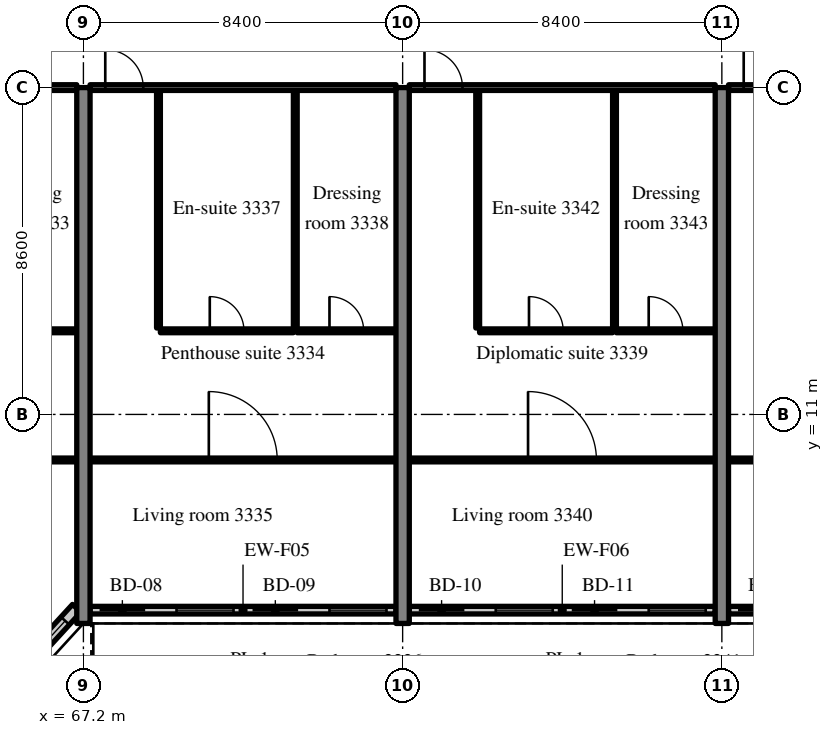
"""IFC4 building model, lengths in metres.
Left out: names, types, materials, properties, quantities, classifications, styles, units other than length and angle.
Written with IfcOpenShell. Run it as: python <this file> out.ifc"""

import sys

from ifc_helpers import new_model, si_unit, direction, frame, frame_2d, origin, place, context, subcontext, project, spatial, rectangle, extrude, source, transform, mapped, element, fill, save


model = new_model("IFC4")
c1 = context("Model", 3, precision=1e-05, world=origin(), true_north=direction((0.0, 1.0)))
c2 = subcontext(c1, "Body", "Model", "MODEL_VIEW")
j1 = project(units=[si_unit("LENGTHUNIT", "METRE"), si_unit("PLANEANGLEUNIT", "RADIAN")], contexts=[c1])
p1 = place(None, origin())
s1 = spatial("IfcSite", under=j1, at=p1, CompositionType="ELEMENT")
p2 = place(p1, origin())
s2 = spatial("IfcBuilding", under=s1, at=p2, CompositionType="ELEMENT")
p3 = place(p2, frame((0.0, 0.0, 137.0)))
s3 = spatial("IfcBuildingStorey", under=s2, at=p3, CompositionType="ELEMENT", Elevation=137.0)
m1 = source(origin(), c2, "Body", "SweptSolid", [
    extrude(rectangle(XDim=14.1, YDim=0.35, at=frame_2d((7.05, 0.0))), origin(), (0.0, 0.0, 1.0), 3.52),
])
for number, where, z_axis, x_axis in (
    (1, (67.2, 5.5, 0.0), (0.0, 0.0, 1.0), (0.0, 1.0, 0.0)),
    (2, (75.6, 5.5, 0.0), (0.0, 0.0, 1.0), (0.0, 1.0, 0.0)),
    (3, (84.0, 5.5, 0.0), (0.0, 0.0, 1.0), (0.0, 1.0, 0.0)),
):
    element("IfcWall", number, at=place(p3, frame(where, z_axis=z_axis, x_axis=x_axis)), inside=s3, PredefinedType="SHEAR", context=c2, shape_type="MappedRepresentation", body=[
        mapped(m1, transform((0.0, 0.0, 0.0), scale=1.0)),
    ])
m2 = source(origin(), c2, "Body", "SweptSolid", [
    extrude(rectangle(XDim=2.398, YDim=0.3, at=frame_2d((1.199, 0.0))), origin(), (0.0, 0.0, 1.0), 3.52),
])
p4 = place(p3, frame((65.404, 4.131, 0.0), z_axis=(0.0, 0.0, 1.0), x_axis=(0.675374189419, 0.737475222815, 0.0)))
e4 = element("IfcWall", 4, at=p4, inside=s3, PredefinedType="SOLIDWALL", context=c2, shape_type="MappedRepresentation", body=[
    mapped(m2, transform((0.0, 0.0, 0.0), scale=1.0)),
])
m3 = source(origin(), c2, "Body", "SweptSolid", [
    extrude(rectangle(XDim=1.5, YDim=2.0, at=frame_2d((0.75, 1.0))), frame((0.0, 0.16, 0.0), z_axis=(0.0, -1.0, 0.0), x_axis=(1.0, 0.0, 0.0)), (0.0, 0.0, 1.0), 0.32),
])
p5 = place(p4, frame((0.449, 0.0, 0.9)))
e5 = element("IfcOpeningElement", 5, at=p5, cuts=e4, PredefinedType="OPENING", context=c2, shape_type="MappedRepresentation", body=[
    mapped(m3, transform((0.0, 0.0, 0.0), scale=1.0)),
])
m4 = source(origin(), c2, "Body", "SweptSolid", [
    extrude(rectangle(XDim=8.05, YDim=0.2, at=frame_2d((4.025, 0.0))), origin(), (0.0, 0.0, 1.0), 2.82),
])
p6 = place(p3, frame((67.375, 5.85, 0.0), z_axis=(0.0, 0.0, 1.0), x_axis=(1.0, 0.0, 0.0)))
e6 = element("IfcWall", 6, at=p6, inside=s3, PredefinedType="SOLIDWALL", context=c2, shape_type="MappedRepresentation", body=[
    mapped(m4, transform((0.0, 0.0, 0.0), scale=1.0)),
])
m5 = source(origin(), c2, "Body", "SweptSolid", [
    extrude(rectangle(XDim=1.2, YDim=2.4, at=frame_2d((0.6, 1.2))), frame((0.0, 0.11, 0.0), z_axis=(0.0, -1.0, 0.0), x_axis=(1.0, 0.0, 0.0)), (0.0, 0.0, 1.0), 0.22),
])
p7 = place(p6, frame((0.25, 0.0, 0.0)))
e7 = element("IfcOpeningElement", 7, at=p7, cuts=e6, PredefinedType="OPENING", context=c2, shape_type="MappedRepresentation", body=[
    mapped(m5, transform((0.0, 0.0, 0.0), scale=1.0)),
])
m6 = source(origin(), c2, "Body", "SweptSolid", [
    extrude(rectangle(XDim=1.5, YDim=1.5, at=frame_2d((0.75, 0.75))), frame((0.0, 0.11, 0.0), z_axis=(0.0, -1.0, 0.0), x_axis=(1.0, 0.0, 0.0)), (0.0, 0.0, 1.0), 0.22),
])
p8 = place(p6, frame((2.275, 0.0, 0.9)))
e8 = element("IfcOpeningElement", 8, at=p8, cuts=e6, PredefinedType="OPENING", context=c2, shape_type="MappedRepresentation", body=[
    mapped(m6, transform((0.0, 0.0, 0.0), scale=1.0)),
])
p9 = place(p6, frame((4.275, 0.0, 0.0)))
e9 = element("IfcOpeningElement", 9, at=p9, cuts=e6, PredefinedType="OPENING", context=c2, shape_type="MappedRepresentation", body=[
    mapped(m5, transform((0.0, 0.0, 0.0), scale=1.0)),
])
p10 = place(p6, frame((6.3, 0.0, 0.9)))
e10 = element("IfcOpeningElement", 10, at=p10, cuts=e6, PredefinedType="OPENING", context=c2, shape_type="MappedRepresentation", body=[
    mapped(m6, transform((0.0, 0.0, 0.0), scale=1.0)),
])
p11 = place(p3, frame((75.775, 5.85, 0.0), z_axis=(0.0, 0.0, 1.0), x_axis=(1.0, 0.0, 0.0)))
e11 = element("IfcWall", 11, at=p11, inside=s3, PredefinedType="SOLIDWALL", context=c2, shape_type="MappedRepresentation", body=[
    mapped(m4, transform((0.0, 0.0, 0.0), scale=1.0)),
])
p12 = place(p11, frame((0.25, 0.0, 0.0)))
e12 = element("IfcOpeningElement", 12, at=p12, cuts=e11, PredefinedType="OPENING", context=c2, shape_type="MappedRepresentation", body=[
    mapped(m5, transform((0.0, 0.0, 0.0), scale=1.0)),
])
p13 = place(p11, frame((2.275, 0.0, 0.9)))
e13 = element("IfcOpeningElement", 13, at=p13, cuts=e11, PredefinedType="OPENING", context=c2, shape_type="MappedRepresentation", body=[
    mapped(m6, transform((0.0, 0.0, 0.0), scale=1.0)),
])
p14 = place(p11, frame((4.275, 0.0, 0.0)))
e14 = element("IfcOpeningElement", 14, at=p14, cuts=e11, PredefinedType="OPENING", context=c2, shape_type="MappedRepresentation", body=[
    mapped(m5, transform((0.0, 0.0, 0.0), scale=1.0)),
])
p15 = place(p11, frame((6.3, 0.0, 0.9)))
e15 = element("IfcOpeningElement", 15, at=p15, cuts=e11, PredefinedType="OPENING", context=c2, shape_type="MappedRepresentation", body=[
    mapped(m6, transform((0.0, 0.0, 0.0), scale=1.0)),
])
p16 = place(p3, frame((84.175, 5.85, 0.0), z_axis=(0.0, 0.0, 1.0), x_axis=(1.0, 0.0, 0.0)))
e16 = element("IfcWall", 16, at=p16, inside=s3, PredefinedType="SOLIDWALL", context=c2, shape_type="MappedRepresentation", body=[
    mapped(m4, transform((0.0, 0.0, 0.0), scale=1.0)),
])
p17 = place(p16, frame((0.25, 0.0, 0.0)))
e17 = element("IfcOpeningElement", 17, at=p17, cuts=e16, PredefinedType="OPENING", context=c2, shape_type="MappedRepresentation", body=[
    mapped(m5, transform((0.0, 0.0, 0.0), scale=1.0)),
])
p18 = place(p16, frame((2.275, 0.0, 0.9)))
e18 = element("IfcOpeningElement", 18, at=p18, cuts=e16, PredefinedType="OPENING", context=c2, shape_type="MappedRepresentation", body=[
    mapped(m6, transform((0.0, 0.0, 0.0), scale=1.0)),
])
p19 = place(p16, frame((4.275, 0.0, 0.0)))
e19 = element("IfcOpeningElement", 19, at=p19, cuts=e16, PredefinedType="OPENING", context=c2, shape_type="MappedRepresentation", body=[
    mapped(m5, transform((0.0, 0.0, 0.0), scale=1.0)),
])
p20 = place(p16, frame((6.3, 0.0, 0.9)))
e20 = element("IfcOpeningElement", 20, at=p20, cuts=e16, PredefinedType="OPENING", context=c2, shape_type="MappedRepresentation", body=[
    mapped(m6, transform((0.0, 0.0, 0.0), scale=1.0)),
])
m7 = source(origin(), c2, "Body", "SweptSolid", [
    extrude(rectangle(XDim=2.6, YDim=0.1, at=frame_2d((1.3, 0.0))), origin(), (0.0, 0.0, 1.0), 3.52),
])
p21 = place(p3, frame((64.425, 13.2, 0.0), z_axis=(0.0, 0.0, 1.0), x_axis=(1.0, 0.0, 0.0)))
e21 = element("IfcWall", 21, at=p21, inside=s3, PredefinedType="PARTITIONING", context=c2, shape_type="MappedRepresentation", body=[
    mapped(m7, transform((0.0, 0.0, 0.0), scale=1.0)),
])
m8 = source(origin(), c2, "Body", "SweptSolid", [
    extrude(rectangle(XDim=0.9, YDim=2.1, at=frame_2d((0.45, 1.05))), frame((0.0, 0.06, 0.0), z_axis=(0.0, -1.0, 0.0), x_axis=(1.0, 0.0, 0.0)), (0.0, 0.0, 1.0), 0.12),
])
p22 = place(p21, frame((0.85, 0.0, 0.0)))
e22 = element("IfcOpeningElement", 22, at=p22, cuts=e21, PredefinedType="OPENING", context=c2, shape_type="MappedRepresentation", body=[
    mapped(m8, transform((0.0, 0.0, 0.0), scale=1.0)),
])
m9 = source(origin(), c2, "Body", "SweptSolid", [
    extrude(rectangle(XDim=8.05, YDim=0.1, at=frame_2d((4.025, 0.0))), origin(), (0.0, 0.0, 1.0), 3.52),
])
p23 = place(p3, frame((58.975, 9.802, 0.0), z_axis=(0.0, 0.0, 1.0), x_axis=(1.0, 0.0, 0.0)))
e23 = element("IfcWall", 23, at=p23, inside=s3, PredefinedType="PARTITIONING", context=c2, shape_type="MappedRepresentation", body=[
    mapped(m9, transform((0.0, 0.0, 0.0), scale=1.0)),
])
m10 = source(origin(), c2, "Body", "SweptSolid", [
    extrude(rectangle(XDim=1.8, YDim=2.1, at=frame_2d((0.9, 1.05))), frame((0.0, 0.06, 0.0), z_axis=(0.0, -1.0, 0.0), x_axis=(1.0, 0.0, 0.0)), (0.0, 0.0, 1.0), 0.12),
])
p24 = place(p23, frame((3.125, 0.0, 0.0)))
e24 = element("IfcOpeningElement", 24, at=p24, cuts=e23, PredefinedType="OPENING", context=c2, shape_type="MappedRepresentation", body=[
    mapped(m10, transform((0.0, 0.0, 0.0), scale=1.0)),
])
m11 = source(origin(), c2, "Body", "SweptSolid", [
    extrude(rectangle(XDim=8.05, YDim=0.15, at=frame_2d((4.025, 0.0))), origin(), (0.0, 0.0, 1.0), 2.82),
])
p25 = place(p3, frame((58.975, 19.6, 0.0), z_axis=(0.0, 0.0, 1.0), x_axis=(1.0, 0.0, 0.0)))
e25 = element("IfcWall", 25, at=p25, inside=s3, PredefinedType="PARTITIONING", context=c2, shape_type="MappedRepresentation", body=[
    mapped(m11, transform((0.0, 0.0, 0.0), scale=1.0)),
])
m12 = source(origin(), c2, "Body", "SweptSolid", [
    extrude(rectangle(XDim=1.0, YDim=2.1, at=frame_2d((0.5, 1.05))), frame((0.0, 0.085, 0.0), z_axis=(0.0, -1.0, 0.0), x_axis=(1.0, 0.0, 0.0)), (0.0, 0.0, 1.0), 0.17),
])
p26 = place(p25, frame((0.4, 0.0, 0.0)))
e26 = element("IfcOpeningElement", 26, at=p26, cuts=e25, PredefinedType="OPENING", context=c2, shape_type="MappedRepresentation", body=[
    mapped(m12, transform((0.0, 0.0, 0.0), scale=1.0)),
])
m13 = source(origin(), c2, "Body", "SweptSolid", [
    extrude(rectangle(XDim=6.25, YDim=0.1, at=frame_2d((3.125, 0.0))), origin(), (0.0, 0.0, 1.0), 3.52),
])
for number, where, z_axis, x_axis in (
    (27, (69.175, 13.275, 0.0), (0.0, 0.0, 1.0), (0.0, 1.0, 0.0)),
    (28, (72.775, 13.275, 0.0), (0.0, 0.0, 1.0), (0.0, 1.0, 0.0)),
):
    element("IfcWall", number, at=place(p3, frame(where, z_axis=z_axis, x_axis=x_axis)), inside=s3, PredefinedType="PARTITIONING", context=c2, shape_type="MappedRepresentation", body=[
        mapped(m13, transform((0.0, 0.0, 0.0), scale=1.0)),
    ])
m14 = source(origin(), c2, "Body", "SweptSolid", [
    extrude(rectangle(XDim=3.5, YDim=0.1, at=frame_2d((1.75, 0.0))), origin(), (0.0, 0.0, 1.0), 3.52),
])
p27 = place(p3, frame((69.225, 13.2, 0.0), z_axis=(0.0, 0.0, 1.0), x_axis=(1.0, 0.0, 0.0)))
e29 = element("IfcWall", 29, at=p27, inside=s3, PredefinedType="PARTITIONING", context=c2, shape_type="MappedRepresentation", body=[
    mapped(m14, transform((0.0, 0.0, 0.0), scale=1.0)),
])
p28 = place(p27, frame((1.3, 0.0, 0.0)))
e30 = element("IfcOpeningElement", 30, at=p28, cuts=e29, PredefinedType="OPENING", context=c2, shape_type="MappedRepresentation", body=[
    mapped(m8, transform((0.0, 0.0, 0.0), scale=1.0)),
])
m15 = source(origin(), c2, "Body", "SweptSolid", [
    extrude(rectangle(XDim=2.6, YDim=0.1, at=frame_2d((1.3, 0.0))), origin(), (0.0, 0.0, 1.0), 3.52),
])
p29 = place(p3, frame((72.825, 13.2, 0.0), z_axis=(0.0, 0.0, 1.0), x_axis=(1.0, 0.0, 0.0)))
e31 = element("IfcWall", 31, at=p29, inside=s3, PredefinedType="PARTITIONING", context=c2, shape_type="MappedRepresentation", body=[
    mapped(m15, transform((0.0, 0.0, 0.0), scale=1.0)),
])
p30 = place(p29, frame((0.85, 0.0, 0.0)))
e32 = element("IfcOpeningElement", 32, at=p30, cuts=e31, PredefinedType="OPENING", context=c2, shape_type="MappedRepresentation", body=[
    mapped(m8, transform((0.0, 0.0, 0.0), scale=1.0)),
])
m16 = source(origin(), c2, "Body", "SweptSolid", [
    extrude(rectangle(XDim=8.05, YDim=0.1, at=frame_2d((4.025, 0.0))), origin(), (0.0, 0.0, 1.0), 3.52),
])
p31 = place(p3, frame((67.375, 9.802, 0.0), z_axis=(0.0, 0.0, 1.0), x_axis=(1.0, 0.0, 0.0)))
e33 = element("IfcWall", 33, at=p31, inside=s3, PredefinedType="PARTITIONING", context=c2, shape_type="MappedRepresentation", body=[
    mapped(m16, transform((0.0, 0.0, 0.0), scale=1.0)),
])
p32 = place(p31, frame((3.125, 0.0, 0.0)))
e34 = element("IfcOpeningElement", 34, at=p32, cuts=e33, PredefinedType="OPENING", context=c2, shape_type="MappedRepresentation", body=[
    mapped(m10, transform((0.0, 0.0, 0.0), scale=1.0)),
])
m17 = source(origin(), c2, "Body", "SweptSolid", [
    extrude(rectangle(XDim=8.05, YDim=0.15, at=frame_2d((4.025, 0.0))), origin(), (0.0, 0.0, 1.0), 2.82),
])
p33 = place(p3, frame((67.375, 19.6, 0.0), z_axis=(0.0, 0.0, 1.0), x_axis=(1.0, 0.0, 0.0)))
e35 = element("IfcWall", 35, at=p33, inside=s3, PredefinedType="PARTITIONING", context=c2, shape_type="MappedRepresentation", body=[
    mapped(m17, transform((0.0, 0.0, 0.0), scale=1.0)),
])
p34 = place(p33, frame((0.4, 0.0, 0.0)))
e36 = element("IfcOpeningElement", 36, at=p34, cuts=e35, PredefinedType="OPENING", context=c2, shape_type="MappedRepresentation", body=[
    mapped(m12, transform((0.0, 0.0, 0.0), scale=1.0)),
])
for number, where, z_axis, x_axis in (
    (37, (77.575, 13.275, 0.0), (0.0, 0.0, 1.0), (0.0, 1.0, 0.0)),
    (38, (81.175, 13.275, 0.0), (0.0, 0.0, 1.0), (0.0, 1.0, 0.0)),
):
    element("IfcWall", number, at=place(p3, frame(where, z_axis=z_axis, x_axis=x_axis)), inside=s3, PredefinedType="PARTITIONING", context=c2, shape_type="MappedRepresentation", body=[
        mapped(m13, transform((0.0, 0.0, 0.0), scale=1.0)),
    ])
p35 = place(p3, frame((77.625, 13.2, 0.0), z_axis=(0.0, 0.0, 1.0), x_axis=(1.0, 0.0, 0.0)))
e39 = element("IfcWall", 39, at=p35, inside=s3, PredefinedType="PARTITIONING", context=c2, shape_type="MappedRepresentation", body=[
    mapped(m14, transform((0.0, 0.0, 0.0), scale=1.0)),
])
p36 = place(p35, frame((1.3, 0.0, 0.0)))
e40 = element("IfcOpeningElement", 40, at=p36, cuts=e39, PredefinedType="OPENING", context=c2, shape_type="MappedRepresentation", body=[
    mapped(m8, transform((0.0, 0.0, 0.0), scale=1.0)),
])
p37 = place(p3, frame((81.225, 13.2, 0.0), z_axis=(0.0, 0.0, 1.0), x_axis=(1.0, 0.0, 0.0)))
e41 = element("IfcWall", 41, at=p37, inside=s3, PredefinedType="PARTITIONING", context=c2, shape_type="MappedRepresentation", body=[
    mapped(m7, transform((0.0, 0.0, 0.0), scale=1.0)),
])
p38 = place(p37, frame((0.85, 0.0, 0.0)))
e42 = element("IfcOpeningElement", 42, at=p38, cuts=e41, PredefinedType="OPENING", context=c2, shape_type="MappedRepresentation", body=[
    mapped(m8, transform((0.0, 0.0, 0.0), scale=1.0)),
])
p39 = place(p3, frame((75.775, 9.802, 0.0), z_axis=(0.0, 0.0, 1.0), x_axis=(1.0, 0.0, 0.0)))
e43 = element("IfcWall", 43, at=p39, inside=s3, PredefinedType="PARTITIONING", context=c2, shape_type="MappedRepresentation", body=[
    mapped(m16, transform((0.0, 0.0, 0.0), scale=1.0)),
])
p40 = place(p39, frame((3.125, 0.0, 0.0)))
e44 = element("IfcOpeningElement", 44, at=p40, cuts=e43, PredefinedType="OPENING", context=c2, shape_type="MappedRepresentation", body=[
    mapped(m10, transform((0.0, 0.0, 0.0), scale=1.0)),
])
p41 = place(p3, frame((75.775, 19.6, 0.0), z_axis=(0.0, 0.0, 1.0), x_axis=(1.0, 0.0, 0.0)))
e45 = element("IfcWall", 45, at=p41, inside=s3, PredefinedType="PARTITIONING", context=c2, shape_type="MappedRepresentation", body=[
    mapped(m17, transform((0.0, 0.0, 0.0), scale=1.0)),
])
p42 = place(p41, frame((0.4, 0.0, 0.0)))
e46 = element("IfcOpeningElement", 46, at=p42, cuts=e45, PredefinedType="OPENING", context=c2, shape_type="MappedRepresentation", body=[
    mapped(m12, transform((0.0, 0.0, 0.0), scale=1.0)),
])
p43 = place(p3, frame((84.175, 9.802, 0.0), z_axis=(0.0, 0.0, 1.0), x_axis=(1.0, 0.0, 0.0)))
e47 = element("IfcWall", 47, at=p43, inside=s3, PredefinedType="PARTITIONING", context=c2, shape_type="MappedRepresentation", body=[
    mapped(m16, transform((0.0, 0.0, 0.0), scale=1.0)),
])
p44 = place(p43, frame((3.125, 0.0, 0.0)))
e48 = element("IfcOpeningElement", 48, at=p44, cuts=e47, PredefinedType="OPENING", context=c2, shape_type="MappedRepresentation", body=[
    mapped(m10, transform((0.0, 0.0, 0.0), scale=1.0)),
])
p45 = place(p3, frame((84.175, 19.6, 0.0), z_axis=(0.0, 0.0, 1.0), x_axis=(1.0, 0.0, 0.0)))
e49 = element("IfcWall", 49, at=p45, inside=s3, PredefinedType="PARTITIONING", context=c2, shape_type="MappedRepresentation", body=[
    mapped(m17, transform((0.0, 0.0, 0.0), scale=1.0)),
])
p46 = place(p45, frame((0.4, 0.0, 0.0)))
e50 = element("IfcOpeningElement", 50, at=p46, cuts=e49, PredefinedType="OPENING", context=c2, shape_type="MappedRepresentation", body=[
    mapped(m12, transform((0.0, 0.0, 0.0), scale=1.0)),
])
m18 = source(origin(), c2, "Body", "SweptSolid", [
    extrude(rectangle(XDim=1.5, YDim=2.0, at=frame_2d((0.75, 1.0))), frame((0.0, 0.03, 0.0), z_axis=(0.0, -1.0, 0.0), x_axis=(1.0, 0.0, 0.0)), (0.0, 0.0, 1.0), 0.06),
])
p47 = place(p5, origin())
e51 = element("IfcWindow", 51, at=p47, inside=s3, PartitioningType="SINGLE_PANEL", PredefinedType="WINDOW", context=c2, shape_type="MappedRepresentation", body=[
    mapped(m18, transform((0.0, 0.0, 0.0), scale=1.0)),
])
fill(e5, e51)
m19 = source(origin(), c2, "Body", "SweptSolid", [
    extrude(rectangle(XDim=1.2, YDim=2.4, at=frame_2d((0.6, 1.2))), frame((0.0, 0.025, 0.0), z_axis=(0.0, -1.0, 0.0), x_axis=(1.0, 0.0, 0.0)), (0.0, 0.0, 1.0), 0.05),
])
p48 = place(p7, origin())
e52 = element("IfcDoor", 52, at=p48, inside=s3, OperationType="SLIDING_TO_RIGHT", PredefinedType="DOOR", context=c2, shape_type="MappedRepresentation", body=[
    mapped(m19, transform((0.0, 0.0, 0.0), scale=1.0)),
])
fill(e7, e52)
m20 = source(origin(), c2, "Body", "SweptSolid", [
    extrude(rectangle(XDim=1.5, YDim=1.5, at=frame_2d((0.75, 0.75))), frame((0.0, 0.03, 0.0), z_axis=(0.0, -1.0, 0.0), x_axis=(1.0, 0.0, 0.0)), (0.0, 0.0, 1.0), 0.06),
])
p49 = place(p8, origin())
e53 = element("IfcWindow", 53, at=p49, inside=s3, PartitioningType="SINGLE_PANEL", PredefinedType="WINDOW", context=c2, shape_type="MappedRepresentation", body=[
    mapped(m20, transform((0.0, 0.0, 0.0), scale=1.0)),
])
fill(e8, e53)
p50 = place(p9, origin())
e54 = element("IfcDoor", 54, at=p50, inside=s3, OperationType="SLIDING_TO_LEFT", PredefinedType="DOOR", context=c2, shape_type="MappedRepresentation", body=[
    mapped(m19, transform((0.0, 0.0, 0.0), scale=1.0)),
])
fill(e9, e54)
p51 = place(p10, origin())
e55 = element("IfcWindow", 55, at=p51, inside=s3, PartitioningType="SINGLE_PANEL", PredefinedType="WINDOW", context=c2, shape_type="MappedRepresentation", body=[
    mapped(m20, transform((0.0, 0.0, 0.0), scale=1.0)),
])
fill(e10, e55)
p52 = place(p12, origin())
e56 = element("IfcDoor", 56, at=p52, inside=s3, OperationType="SLIDING_TO_RIGHT", PredefinedType="DOOR", context=c2, shape_type="MappedRepresentation", body=[
    mapped(m19, transform((0.0, 0.0, 0.0), scale=1.0)),
])
fill(e12, e56)
p53 = place(p13, origin())
e57 = element("IfcWindow", 57, at=p53, inside=s3, PartitioningType="SINGLE_PANEL", PredefinedType="WINDOW", context=c2, shape_type="MappedRepresentation", body=[
    mapped(m20, transform((0.0, 0.0, 0.0), scale=1.0)),
])
fill(e13, e57)
p54 = place(p14, origin())
e58 = element("IfcDoor", 58, at=p54, inside=s3, OperationType="SLIDING_TO_LEFT", PredefinedType="DOOR", context=c2, shape_type="MappedRepresentation", body=[
    mapped(m19, transform((0.0, 0.0, 0.0), scale=1.0)),
])
fill(e14, e58)
p55 = place(p15, origin())
e59 = element("IfcWindow", 59, at=p55, inside=s3, PartitioningType="SINGLE_PANEL", PredefinedType="WINDOW", context=c2, shape_type="MappedRepresentation", body=[
    mapped(m20, transform((0.0, 0.0, 0.0), scale=1.0)),
])
fill(e15, e59)
p56 = place(p17, origin())
e60 = element("IfcDoor", 60, at=p56, inside=s3, OperationType="SLIDING_TO_RIGHT", PredefinedType="DOOR", context=c2, shape_type="MappedRepresentation", body=[
    mapped(m19, transform((0.0, 0.0, 0.0), scale=1.0)),
])
fill(e17, e60)
m21 = source(origin(), c2, "Body", "SweptSolid", [
    extrude(rectangle(XDim=0.9, YDim=2.1, at=frame_2d((0.45, 1.05))), frame((0.0, 0.025, 0.0), z_axis=(0.0, -1.0, 0.0), x_axis=(1.0, 0.0, 0.0)), (0.0, 0.0, 1.0), 0.05),
])
p57 = place(p28, origin())
e61 = element("IfcDoor", 61, at=p57, inside=s3, OperationType="SINGLE_SWING_LEFT", PredefinedType="DOOR", context=c2, shape_type="MappedRepresentation", body=[
    mapped(m21, transform((0.0, 0.0, 0.0), scale=1.0)),
])
fill(e30, e61)
p58 = place(p30, origin())
e62 = element("IfcDoor", 62, at=p58, inside=s3, OperationType="SINGLE_SWING_LEFT", PredefinedType="DOOR", context=c2, shape_type="MappedRepresentation", body=[
    mapped(m21, transform((0.0, 0.0, 0.0), scale=1.0)),
])
fill(e32, e62)
m22 = source(origin(), c2, "Body", "SweptSolid", [
    extrude(rectangle(XDim=1.8, YDim=2.1, at=frame_2d((0.9, 1.05))), frame((0.0, 0.025, 0.0), z_axis=(0.0, -1.0, 0.0), x_axis=(1.0, 0.0, 0.0)), (0.0, 0.0, 1.0), 0.05),
])
p59 = place(p32, origin())
e63 = element("IfcDoor", 63, at=p59, inside=s3, OperationType="DOUBLE_DOOR_SINGLE_SWING", PredefinedType="DOOR", context=c2, shape_type="MappedRepresentation", body=[
    mapped(m22, transform((0.0, 0.0, 0.0), scale=1.0)),
])
fill(e34, e63)
m23 = source(origin(), c2, "Body", "SweptSolid", [
    extrude(rectangle(XDim=1.0, YDim=2.1, at=frame_2d((0.5, 1.05))), frame((0.0, 0.025, 0.0), z_axis=(0.0, -1.0, 0.0), x_axis=(1.0, 0.0, 0.0)), (0.0, 0.0, 1.0), 0.05),
])
p60 = place(p34, origin())
e64 = element("IfcDoor", 64, at=p60, inside=s3, OperationType="SINGLE_SWING_LEFT", PredefinedType="DOOR", context=c2, shape_type="MappedRepresentation", body=[
    mapped(m23, transform((0.0, 0.0, 0.0), scale=1.0)),
])
fill(e36, e64)
p61 = place(p36, origin())
e65 = element("IfcDoor", 65, at=p61, inside=s3, OperationType="SINGLE_SWING_LEFT", PredefinedType="DOOR", context=c2, shape_type="MappedRepresentation", body=[
    mapped(m21, transform((0.0, 0.0, 0.0), scale=1.0)),
])
fill(e40, e65)
p62 = place(p38, origin())
e66 = element("IfcDoor", 66, at=p62, inside=s3, OperationType="SINGLE_SWING_LEFT", PredefinedType="DOOR", context=c2, shape_type="MappedRepresentation", body=[
    mapped(m21, transform((0.0, 0.0, 0.0), scale=1.0)),
])
fill(e42, e66)
p63 = place(p40, origin())
e67 = element("IfcDoor", 67, at=p63, inside=s3, OperationType="DOUBLE_DOOR_SINGLE_SWING", PredefinedType="DOOR", context=c2, shape_type="MappedRepresentation", body=[
    mapped(m22, transform((0.0, 0.0, 0.0), scale=1.0)),
])
fill(e44, e67)
p64 = place(p42, origin())
e68 = element("IfcDoor", 68, at=p64, inside=s3, OperationType="SINGLE_SWING_LEFT", PredefinedType="DOOR", context=c2, shape_type="MappedRepresentation", body=[
    mapped(m23, transform((0.0, 0.0, 0.0), scale=1.0)),
])
fill(e46, e68)
p65 = place(p46, origin())
e69 = element("IfcDoor", 69, at=p65, inside=s3, OperationType="SINGLE_SWING_LEFT", PredefinedType="DOOR", context=c2, shape_type="MappedRepresentation", body=[
    mapped(m23, transform((0.0, 0.0, 0.0), scale=1.0)),
])
fill(e50, e69)
save(model, sys.argv[1])
